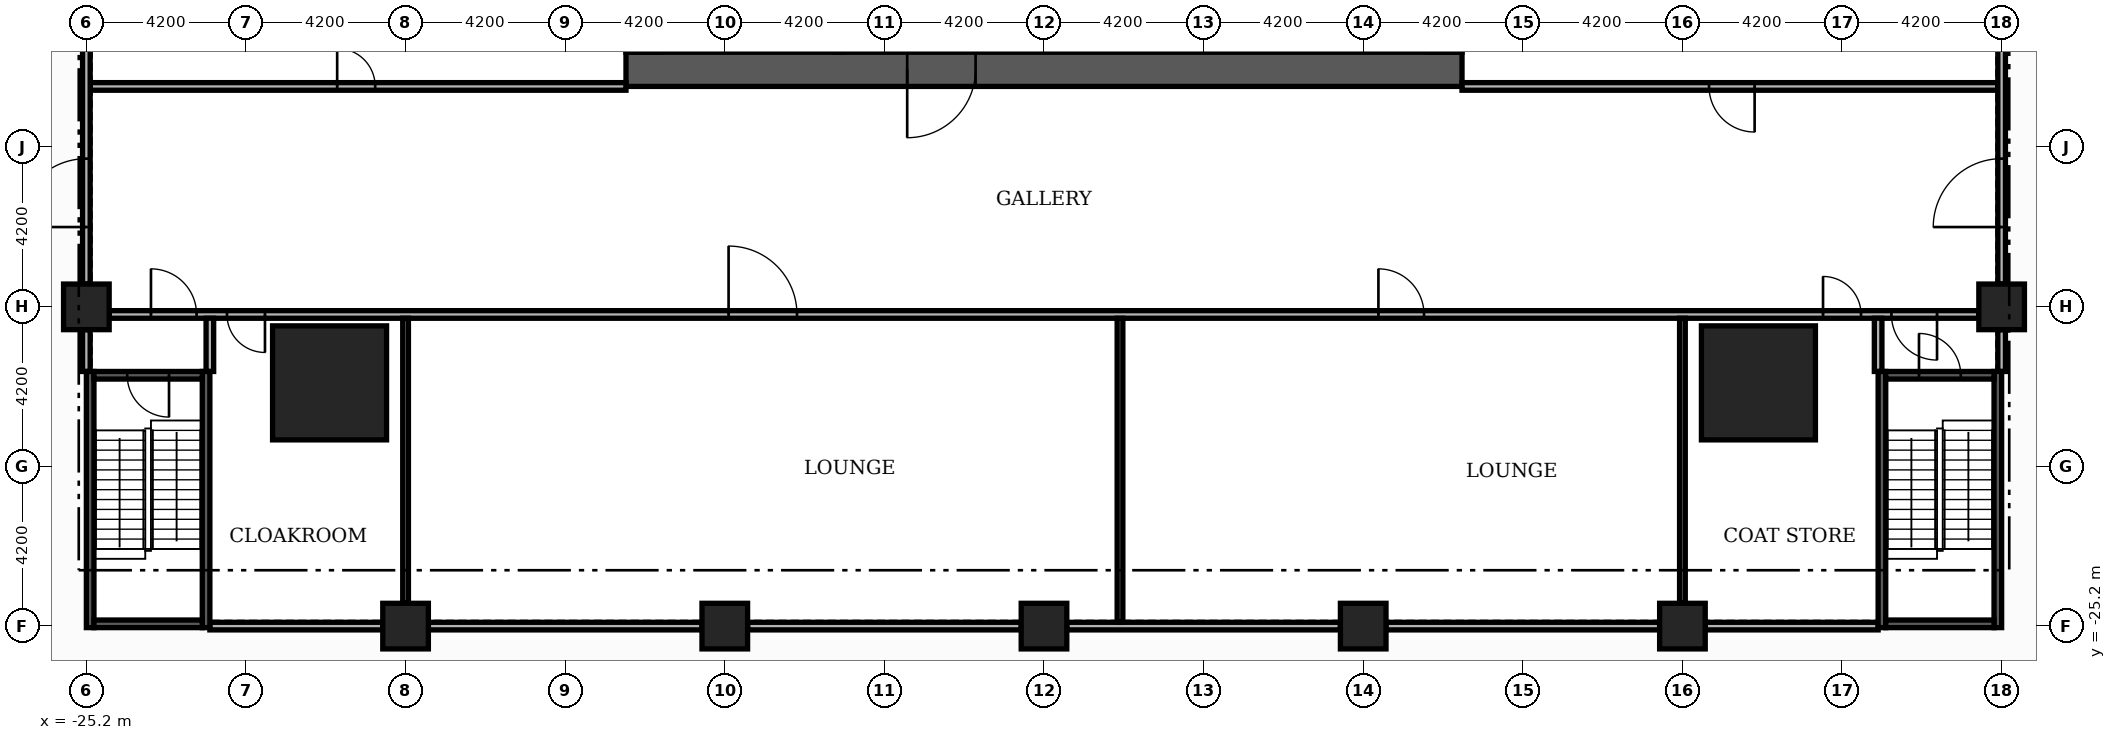
"""IFC4 building model, lengths in metres.
Left out: names, types, materials, properties, quantities, classifications, styles, units other than length and angle.
Written with IfcOpenShell. Run it as: python <this file> out.ifc"""

import sys

from ifc_helpers import new_model, si_unit, direction, frame, frame_2d, origin, origin_2d, place, context, subcontext, project, spatial, rectangle, extrude, element, fill, save


model = new_model("IFC4")
c1 = context("Model", 3, precision=1e-05, world=origin(), true_north=direction((0.0, 1.0)))
c2 = subcontext(c1, "Body", "Model", "MODEL_VIEW")
j1 = project(units=[si_unit("LENGTHUNIT", "METRE"), si_unit("PLANEANGLEUNIT", "RADIAN")], contexts=[c1])
p1 = place(None, origin())
s1 = spatial("IfcSite", under=j1, at=p1, CompositionType="ELEMENT")
p2 = place(p1, origin())
s2 = spatial("IfcBuilding", under=s1, at=p2, CompositionType="ELEMENT")
p3 = place(p2, frame((0.0, 0.0, 7.2)))
s3 = spatial("IfcBuildingStorey", under=s2, at=p3, CompositionType="ELEMENT", Elevation=7.2)
p4 = place(p3, frame((-11.0, -10.55, 0.0), z_axis=(0.0, 0.0, 1.0), x_axis=(1.0, 0.0, 0.0)))
e1 = element("IfcWall", 1, at=p4, inside=s3, PredefinedType="SHEAR", context=c2, shape_type="SweptSolid", body=[
    extrude(rectangle(XDim=22.0, YDim=0.9, at=frame_2d((11.0, 0.0))), origin(), (0.0, 0.0, 1.0), 4.38),
])
p5 = place(p4, frame((7.4, 0.0, 0.0)))
e2 = element("IfcOpeningElement", 2, at=p5, cuts=e1, PredefinedType="OPENING", context=c2, shape_type="SweptSolid", body=[
    extrude(rectangle(XDim=1.8, YDim=2.2, at=frame_2d((0.9, 1.1))), frame((0.0, 0.46, 0.0), z_axis=(0.0, -1.0, 0.0), x_axis=(1.0, 0.0, 0.0)), (0.0, 0.0, 1.0), 0.92),
])
for number, where, z_axis, x_axis in (
    (3, (18.8, -18.8, 0.0), (0.0, 0.0, 1.0), (1.0, 0.0, 0.0)),
    (4, (-18.8, -18.8, 0.0), (0.0, 0.0, 1.0), (1.0, 0.0, 0.0)),
):
    element("IfcColumn", number, at=place(p3, frame(where, z_axis=z_axis, x_axis=x_axis)), inside=s3, PredefinedType="COLUMN", context=c2, shape_type="SweptSolid", body=[
        extrude(rectangle(XDim=3.0, YDim=3.0, at=origin_2d()), origin(), (0.0, 0.0, 1.0), 4.8),
    ])
for number, where, z_axis, x_axis in (
    (5, (25.2, -16.8, 0.0), (0.0, 0.0, 1.0), (1.0, 0.0, 0.0)),
    (6, (0.0, -25.2, 0.0), (0.0, 0.0, 1.0), (1.0, 0.0, 0.0)),
    (7, (8.4, -25.2, 0.0), (0.0, 0.0, 1.0), (1.0, 0.0, 0.0)),
    (8, (16.8, -25.2, 0.0), (0.0, 0.0, 1.0), (1.0, 0.0, 0.0)),
    (9, (-8.4, -25.2, 0.0), (0.0, 0.0, 1.0), (1.0, 0.0, 0.0)),
    (10, (-16.8, -25.2, 0.0), (0.0, 0.0, 1.0), (1.0, 0.0, 0.0)),
    (11, (-25.2, -16.8, 0.0), (0.0, 0.0, 1.0), (1.0, 0.0, 0.0)),
):
    element("IfcColumn", number, at=place(p3, frame(where, z_axis=z_axis, x_axis=x_axis)), inside=s3, PredefinedType="COLUMN", context=c2, shape_type="SweptSolid", body=[
        extrude(rectangle(XDim=1.2, YDim=1.2, at=origin_2d()), origin(), (0.0, 0.0, 1.0), 4.8),
    ])
p6 = place(p3, frame((-21.95, -25.2, 0.0), z_axis=(0.0, 0.0, 1.0), x_axis=(1.0, 0.0, 0.0)))
e12 = element("IfcWall", 12, at=p6, inside=s3, PredefinedType="PARTITIONING", context=c2, shape_type="SweptSolid", body=[
    extrude(rectangle(XDim=4.55, YDim=0.2, at=frame_2d((2.275, 0.0))), origin(), (0.0, 0.0, 1.0), 4.08),
])
for number, where, z_axis, x_axis in (
    (13, (-16.2, -25.2, 0.0), (0.0, 0.0, 1.0), (1.0, 0.0, 0.0)),
    (14, (-7.8, -25.2, 0.0), (0.0, 0.0, 1.0), (1.0, 0.0, 0.0)),
    (15, (0.6, -25.2, 0.0), (0.0, 0.0, 1.0), (1.0, 0.0, 0.0)),
    (16, (9.0, -25.2, 0.0), (0.0, 0.0, 1.0), (1.0, 0.0, 0.0)),
):
    element("IfcWall", number, at=place(p3, frame(where, z_axis=z_axis, x_axis=x_axis)), inside=s3, PredefinedType="PARTITIONING", context=c2, shape_type="SweptSolid", body=[
        extrude(rectangle(XDim=7.2, YDim=0.2, at=frame_2d((3.6, 0.0))), origin(), (0.0, 0.0, 1.0), 4.08),
    ])
p7 = place(p3, frame((17.4, -25.2, 0.0), z_axis=(0.0, 0.0, 1.0), x_axis=(1.0, 0.0, 0.0)))
e17 = element("IfcWall", 17, at=p7, inside=s3, PredefinedType="PARTITIONING", context=c2, shape_type="SweptSolid", body=[
    extrude(rectangle(XDim=4.55, YDim=0.2, at=frame_2d((2.275, 0.0))), origin(), (0.0, 0.0, 1.0), 4.08),
])
p8 = place(p3, frame((-24.6, -17.0, 0.0), z_axis=(0.0, 0.0, 1.0), x_axis=(1.0, 0.0, 0.0)))
e18 = element("IfcWall", 18, at=p8, inside=s3, PredefinedType="PARTITIONING", context=c2, shape_type="SweptSolid", body=[
    extrude(rectangle(XDim=49.2, YDim=0.2, at=frame_2d((24.6, 0.0))), origin(), (0.0, 0.0, 1.0), 4.38),
])
p9 = place(p8, frame((1.1, 0.0, 0.0)))
e19 = element("IfcOpeningElement", 19, at=p9, cuts=e18, PredefinedType="OPENING", context=c2, shape_type="SweptSolid", body=[
    extrude(rectangle(XDim=1.2, YDim=2.2, at=frame_2d((0.6, 1.1))), frame((0.0, 0.11, 0.0), z_axis=(0.0, -1.0, 0.0), x_axis=(1.0, 0.0, 0.0)), (0.0, 0.0, 1.0), 0.22),
])
p10 = place(p8, frame((3.1, 0.0, 0.0)))
e20 = element("IfcOpeningElement", 20, at=p10, cuts=e18, PredefinedType="OPENING", context=c2, shape_type="SweptSolid", body=[
    extrude(rectangle(XDim=1.0, YDim=2.1, at=frame_2d((0.5, 1.05))), frame((0.0, 0.11, 0.0), z_axis=(0.0, -1.0, 0.0), x_axis=(1.0, 0.0, 0.0)), (0.0, 0.0, 1.0), 0.22),
])
p11 = place(p8, frame((16.3, 0.0, 0.0)))
e21 = element("IfcOpeningElement", 21, at=p11, cuts=e18, PredefinedType="OPENING", context=c2, shape_type="SweptSolid", body=[
    extrude(rectangle(XDim=1.8, YDim=2.2, at=frame_2d((0.9, 1.1))), frame((0.0, 0.11, 0.0), z_axis=(0.0, -1.0, 0.0), x_axis=(1.0, 0.0, 0.0)), (0.0, 0.0, 1.0), 0.22),
])
p12 = place(p8, frame((33.4, 0.0, 0.0)))
e22 = element("IfcOpeningElement", 22, at=p12, cuts=e18, PredefinedType="OPENING", context=c2, shape_type="SweptSolid", body=[
    extrude(rectangle(XDim=1.2, YDim=2.2, at=frame_2d((0.6, 1.1))), frame((0.0, 0.11, 0.0), z_axis=(0.0, -1.0, 0.0), x_axis=(1.0, 0.0, 0.0)), (0.0, 0.0, 1.0), 0.22),
])
p13 = place(p8, frame((45.1, 0.0, 0.0)))
e23 = element("IfcOpeningElement", 23, at=p13, cuts=e18, PredefinedType="OPENING", context=c2, shape_type="SweptSolid", body=[
    extrude(rectangle(XDim=1.0, YDim=2.1, at=frame_2d((0.5, 1.05))), frame((0.0, 0.11, 0.0), z_axis=(0.0, -1.0, 0.0), x_axis=(1.0, 0.0, 0.0)), (0.0, 0.0, 1.0), 0.22),
])
p14 = place(p8, frame((46.9, 0.0, 0.0)))
e24 = element("IfcOpeningElement", 24, at=p14, cuts=e18, PredefinedType="OPENING", context=c2, shape_type="SweptSolid", body=[
    extrude(rectangle(XDim=1.2, YDim=2.2, at=frame_2d((0.6, 1.1))), frame((0.0, 0.11, 0.0), z_axis=(0.0, -1.0, 0.0), x_axis=(1.0, 0.0, 0.0)), (0.0, 0.0, 1.0), 0.22),
])
p15 = place(p3, frame((-25.1, -11.0, 0.0), z_axis=(0.0, 0.0, 1.0), x_axis=(1.0, 0.0, 0.0)))
e25 = element("IfcWall", 25, at=p15, inside=s3, PredefinedType="PARTITIONING", context=c2, shape_type="SweptSolid", body=[
    extrude(rectangle(XDim=14.1, YDim=0.2, at=frame_2d((7.05, 0.0))), origin(), (0.0, 0.0, 1.0), 4.38),
])
p16 = place(p15, frame((6.5, 0.0, 0.0)))
e26 = element("IfcOpeningElement", 26, at=p16, cuts=e25, PredefinedType="OPENING", context=c2, shape_type="SweptSolid", body=[
    extrude(rectangle(XDim=1.0, YDim=2.1, at=frame_2d((0.5, 1.05))), frame((0.0, 0.11, 0.0), z_axis=(0.0, -1.0, 0.0), x_axis=(1.0, 0.0, 0.0)), (0.0, 0.0, 1.0), 0.22),
])
p17 = place(p3, frame((11.0, -11.0, 0.0), z_axis=(0.0, 0.0, 1.0), x_axis=(1.0, 0.0, 0.0)))
e27 = element("IfcWall", 27, at=p17, inside=s3, PredefinedType="PARTITIONING", context=c2, shape_type="SweptSolid", body=[
    extrude(rectangle(XDim=14.1, YDim=0.2, at=frame_2d((7.05, 0.0))), origin(), (0.0, 0.0, 1.0), 4.38),
])
p18 = place(p17, frame((6.5, 0.0, 0.0)))
e28 = element("IfcOpeningElement", 28, at=p18, cuts=e27, PredefinedType="OPENING", context=c2, shape_type="SweptSolid", body=[
    extrude(rectangle(XDim=1.2, YDim=2.2, at=frame_2d((0.6, 1.1))), frame((0.0, 0.11, 0.0), z_axis=(0.0, -1.0, 0.0), x_axis=(1.0, 0.0, 0.0)), (0.0, 0.0, 1.0), 0.22),
])
p19 = place(p3, frame((-25.2, -18.5, 0.0), z_axis=(0.0, 0.0, 1.0), x_axis=(0.0, 1.0, 0.0)))
e29 = element("IfcWall", 29, at=p19, inside=s3, PredefinedType="PARTITIONING", context=c2, shape_type="SweptSolid", body=[
    extrude(rectangle(XDim=1.1, YDim=0.2, at=frame_2d((0.55, 0.0))), origin(), (0.0, 0.0, 1.0), 3.98),
])
p20 = place(p3, frame((-25.2, -16.2, 0.0), z_axis=(0.0, 0.0, 1.0), x_axis=(0.0, 1.0, 0.0)))
e30 = element("IfcWall", 30, at=p20, inside=s3, PredefinedType="PARTITIONING", context=c2, shape_type="SweptSolid", body=[
    extrude(rectangle(XDim=7.2, YDim=0.2, at=frame_2d((3.6, 0.0))), origin(), (0.0, 0.0, 1.0), 4.08),
])
p21 = place(p20, frame((1.5, 0.0, 0.0)))
e31 = element("IfcOpeningElement", 31, at=p21, cuts=e30, PredefinedType="OPENING", context=c2, shape_type="SweptSolid", body=[
    extrude(rectangle(XDim=1.8, YDim=2.2, at=frame_2d((0.9, 1.1))), frame((0.0, 0.11, 0.0), z_axis=(0.0, -1.0, 0.0), x_axis=(1.0, 0.0, 0.0)), (0.0, 0.0, 1.0), 0.22),
])
p22 = place(p3, frame((-21.95, -18.5, 0.0), z_axis=(0.0, 0.0, 1.0), x_axis=(0.0, 1.0, 0.0)))
e32 = element("IfcWall", 32, at=p22, inside=s3, PredefinedType="PARTITIONING", context=c2, shape_type="SweptSolid", body=[
    extrude(rectangle(XDim=1.4, YDim=0.2, at=frame_2d((0.7, 0.0))), origin(), (0.0, 0.0, 1.0), 4.38),
])
p23 = place(p3, frame((-16.8, -24.6, 0.0), z_axis=(0.0, 0.0, 1.0), x_axis=(0.0, 1.0, 0.0)))
e33 = element("IfcWall", 33, at=p23, inside=s3, PredefinedType="PARTITIONING", context=c2, shape_type="SweptSolid", body=[
    extrude(rectangle(XDim=7.5, YDim=0.15, at=frame_2d((3.75, 0.0))), origin(), (0.0, 0.0, 1.0), 4.38),
])
p24 = place(p3, frame((2.0, -25.1, 0.0), z_axis=(0.0, 0.0, 1.0), x_axis=(0.0, 1.0, 0.0)))
e34 = element("IfcWall", 34, at=p24, inside=s3, PredefinedType="PARTITIONING", context=c2, shape_type="SweptSolid", body=[
    extrude(rectangle(XDim=8.0, YDim=0.15, at=frame_2d((4.0, 0.0))), origin(), (0.0, 0.0, 1.0), 4.38),
])
p25 = place(p3, frame((16.8, -24.6, 0.0), z_axis=(0.0, 0.0, 1.0), x_axis=(0.0, 1.0, 0.0)))
e35 = element("IfcWall", 35, at=p25, inside=s3, PredefinedType="PARTITIONING", context=c2, shape_type="SweptSolid", body=[
    extrude(rectangle(XDim=7.5, YDim=0.15, at=frame_2d((3.75, 0.0))), origin(), (0.0, 0.0, 1.0), 4.38),
])
p26 = place(p3, frame((21.95, -18.5, 0.0), z_axis=(0.0, 0.0, 1.0), x_axis=(0.0, 1.0, 0.0)))
e36 = element("IfcWall", 36, at=p26, inside=s3, PredefinedType="PARTITIONING", context=c2, shape_type="SweptSolid", body=[
    extrude(rectangle(XDim=1.4, YDim=0.2, at=frame_2d((0.7, 0.0))), origin(), (0.0, 0.0, 1.0), 4.38),
])
p27 = place(p3, frame((25.2, -18.5, 0.0), z_axis=(0.0, 0.0, 1.0), x_axis=(0.0, 1.0, 0.0)))
e37 = element("IfcWall", 37, at=p27, inside=s3, PredefinedType="PARTITIONING", context=c2, shape_type="SweptSolid", body=[
    extrude(rectangle(XDim=1.1, YDim=0.2, at=frame_2d((0.55, 0.0))), origin(), (0.0, 0.0, 1.0), 3.98),
])
p28 = place(p3, frame((25.2, -16.2, 0.0), z_axis=(0.0, 0.0, 1.0), x_axis=(0.0, 1.0, 0.0)))
e38 = element("IfcWall", 38, at=p28, inside=s3, PredefinedType="PARTITIONING", context=c2, shape_type="SweptSolid", body=[
    extrude(rectangle(XDim=7.2, YDim=0.2, at=frame_2d((3.6, 0.0))), origin(), (0.0, 0.0, 1.0), 4.08),
])
p29 = place(p28, frame((1.5, 0.0, 0.0)))
e39 = element("IfcOpeningElement", 39, at=p29, cuts=e38, PredefinedType="OPENING", context=c2, shape_type="SweptSolid", body=[
    extrude(rectangle(XDim=1.8, YDim=2.2, at=frame_2d((0.9, 1.1))), frame((0.0, 0.11, 0.0), z_axis=(0.0, -1.0, 0.0), x_axis=(1.0, 0.0, 0.0)), (0.0, 0.0, 1.0), 0.22),
])
p30 = place(p3, frame((22.05, -25.24, 0.0), z_axis=(0.0, 0.0, 1.0), x_axis=(0.0, 1.0, 0.0)))
e40 = element("IfcWall", 40, at=p30, inside=s3, PredefinedType="SOLIDWALL", context=c2, shape_type="SweptSolid", body=[
    extrude(rectangle(XDim=6.74, YDim=0.2, at=frame_2d((3.37, 0.0))), origin(), (0.0, 0.0, 1.0), 4.38),
])
p31 = place(p3, frame((25.1, -25.24, 0.0), z_axis=(0.0, 0.0, 1.0), x_axis=(0.0, 1.0, 0.0)))
e41 = element("IfcWall", 41, at=p31, inside=s3, PredefinedType="SOLIDWALL", context=c2, shape_type="SweptSolid", body=[
    extrude(rectangle(XDim=6.74, YDim=0.2, at=frame_2d((3.37, 0.0))), origin(), (0.0, 0.0, 1.0), 3.98),
])
p32 = place(p3, frame((22.15, -25.14, 0.0), z_axis=(0.0, 0.0, 1.0), x_axis=(1.0, 0.0, 0.0)))
e42 = element("IfcWall", 42, at=p32, inside=s3, PredefinedType="SOLIDWALL", context=c2, shape_type="SweptSolid", body=[
    extrude(rectangle(XDim=2.85, YDim=0.2, at=frame_2d((1.425, 0.0))), origin(), (0.0, 0.0, 1.0), 4.08),
])
p33 = place(p3, frame((22.15, -18.6, 0.0), z_axis=(0.0, 0.0, 1.0), x_axis=(1.0, 0.0, 0.0)))
e43 = element("IfcWall", 43, at=p33, inside=s3, PredefinedType="SOLIDWALL", context=c2, shape_type="SweptSolid", body=[
    extrude(rectangle(XDim=2.85, YDim=0.2, at=frame_2d((1.425, 0.0))), origin(), (0.0, 0.0, 1.0), 4.38),
])
p34 = place(p33, frame((0.875, 0.0, 0.0)))
e44 = element("IfcOpeningElement", 44, at=p34, cuts=e43, PredefinedType="OPENING", context=c2, shape_type="SweptSolid", body=[
    extrude(rectangle(XDim=1.1, YDim=2.2, at=frame_2d((0.55, 1.1))), frame((0.0, 0.11, 0.0), z_axis=(0.0, -1.0, 0.0), x_axis=(1.0, 0.0, 0.0)), (0.0, 0.0, 1.0), 0.22),
])
p35 = place(p3, frame((-25.1, -25.24, 0.0), z_axis=(0.0, 0.0, 1.0), x_axis=(0.0, 1.0, 0.0)))
e45 = element("IfcWall", 45, at=p35, inside=s3, PredefinedType="SOLIDWALL", context=c2, shape_type="SweptSolid", body=[
    extrude(rectangle(XDim=6.74, YDim=0.2, at=frame_2d((3.37, 0.0))), origin(), (0.0, 0.0, 1.0), 3.98),
])
p36 = place(p3, frame((-22.05, -25.24, 0.0), z_axis=(0.0, 0.0, 1.0), x_axis=(0.0, 1.0, 0.0)))
e46 = element("IfcWall", 46, at=p36, inside=s3, PredefinedType="SOLIDWALL", context=c2, shape_type="SweptSolid", body=[
    extrude(rectangle(XDim=6.74, YDim=0.2, at=frame_2d((3.37, 0.0))), origin(), (0.0, 0.0, 1.0), 4.38),
])
p37 = place(p3, frame((-25.0, -25.14, 0.0), z_axis=(0.0, 0.0, 1.0), x_axis=(1.0, 0.0, 0.0)))
e47 = element("IfcWall", 47, at=p37, inside=s3, PredefinedType="SOLIDWALL", context=c2, shape_type="SweptSolid", body=[
    extrude(rectangle(XDim=2.85, YDim=0.2, at=frame_2d((1.425, 0.0))), origin(), (0.0, 0.0, 1.0), 4.08),
])
p38 = place(p3, frame((-25.0, -18.6, 0.0), z_axis=(0.0, 0.0, 1.0), x_axis=(1.0, 0.0, 0.0)))
e48 = element("IfcWall", 48, at=p38, inside=s3, PredefinedType="SOLIDWALL", context=c2, shape_type="SweptSolid", body=[
    extrude(rectangle(XDim=2.85, YDim=0.2, at=frame_2d((1.425, 0.0))), origin(), (0.0, 0.0, 1.0), 4.38),
])
p39 = place(p38, frame((0.875, 0.0, 0.0)))
e49 = element("IfcOpeningElement", 49, at=p39, cuts=e48, PredefinedType="OPENING", context=c2, shape_type="SweptSolid", body=[
    extrude(rectangle(XDim=1.1, YDim=2.2, at=frame_2d((0.55, 1.1))), frame((0.0, 0.11, 0.0), z_axis=(0.0, -1.0, 0.0), x_axis=(1.0, 0.0, 0.0)), (0.0, 0.0, 1.0), 0.22),
])
p40 = place(p5, frame((1.8, 0.0, 0.0), z_axis=(0.0, 0.0, 1.0), x_axis=(-1.0, 0.0, 0.0)))
e50 = element("IfcDoor", 50, at=p40, inside=s3, OperationType="DOUBLE_DOOR_SINGLE_SWING", PredefinedType="DOOR", context=c2, shape_type="SweptSolid", body=[
    extrude(rectangle(XDim=1.8, YDim=2.2, at=frame_2d((0.9, 1.1))), frame((0.0, 0.025, 0.0), z_axis=(0.0, -1.0, 0.0), x_axis=(1.0, 0.0, 0.0)), (0.0, 0.0, 1.0), 0.05),
])
fill(e2, e50)
p41 = place(p9, origin())
e51 = element("IfcDoor", 51, at=p41, inside=s3, OperationType="SINGLE_SWING_LEFT", PredefinedType="DOOR", context=c2, shape_type="SweptSolid", body=[
    extrude(rectangle(XDim=1.2, YDim=2.2, at=frame_2d((0.6, 1.1))), frame((0.0, 0.025, 0.0), z_axis=(0.0, -1.0, 0.0), x_axis=(1.0, 0.0, 0.0)), (0.0, 0.0, 1.0), 0.05),
])
fill(e19, e51)
p42 = place(p10, origin())
e52 = element("IfcDoor", 52, at=p42, inside=s3, OperationType="SINGLE_SWING_RIGHT", PredefinedType="DOOR", context=c2, shape_type="SweptSolid", body=[
    extrude(rectangle(XDim=1.0, YDim=2.1, at=frame_2d((0.5, 1.05))), frame((0.0, 0.025, 0.0), z_axis=(0.0, -1.0, 0.0), x_axis=(1.0, 0.0, 0.0)), (0.0, 0.0, 1.0), 0.05),
])
fill(e20, e52)
p43 = place(p11, origin())
e53 = element("IfcDoor", 53, at=p43, inside=s3, OperationType="DOUBLE_DOOR_SINGLE_SWING", PredefinedType="DOOR", context=c2, shape_type="SweptSolid", body=[
    extrude(rectangle(XDim=1.8, YDim=2.2, at=frame_2d((0.9, 1.1))), frame((0.0, 0.025, 0.0), z_axis=(0.0, -1.0, 0.0), x_axis=(1.0, 0.0, 0.0)), (0.0, 0.0, 1.0), 0.05),
])
fill(e21, e53)
p44 = place(p12, origin())
e54 = element("IfcDoor", 54, at=p44, inside=s3, OperationType="SINGLE_SWING_LEFT", PredefinedType="DOOR", context=c2, shape_type="SweptSolid", body=[
    extrude(rectangle(XDim=1.2, YDim=2.2, at=frame_2d((0.6, 1.1))), frame((0.0, 0.025, 0.0), z_axis=(0.0, -1.0, 0.0), x_axis=(1.0, 0.0, 0.0)), (0.0, 0.0, 1.0), 0.05),
])
fill(e22, e54)
p45 = place(p13, origin())
e55 = element("IfcDoor", 55, at=p45, inside=s3, OperationType="SINGLE_SWING_LEFT", PredefinedType="DOOR", context=c2, shape_type="SweptSolid", body=[
    extrude(rectangle(XDim=1.0, YDim=2.1, at=frame_2d((0.5, 1.05))), frame((0.0, 0.025, 0.0), z_axis=(0.0, -1.0, 0.0), x_axis=(1.0, 0.0, 0.0)), (0.0, 0.0, 1.0), 0.05),
])
fill(e23, e55)
p46 = place(p14, origin())
e56 = element("IfcDoor", 56, at=p46, inside=s3, OperationType="SINGLE_SWING_RIGHT", PredefinedType="DOOR", context=c2, shape_type="SweptSolid", body=[
    extrude(rectangle(XDim=1.2, YDim=2.2, at=frame_2d((0.6, 1.1))), frame((0.0, 0.025, 0.0), z_axis=(0.0, -1.0, 0.0), x_axis=(1.0, 0.0, 0.0)), (0.0, 0.0, 1.0), 0.05),
])
fill(e24, e56)
p47 = place(p21, origin())
e57 = element("IfcDoor", 57, at=p47, inside=s3, OperationType="DOUBLE_DOOR_SINGLE_SWING", PredefinedType="DOOR", context=c2, shape_type="SweptSolid", body=[
    extrude(rectangle(XDim=1.8, YDim=2.2, at=frame_2d((0.9, 1.1))), frame((0.0, 0.025, 0.0), z_axis=(0.0, -1.0, 0.0), x_axis=(1.0, 0.0, 0.0)), (0.0, 0.0, 1.0), 0.05),
])
fill(e31, e57)
p48 = place(p29, origin())
e58 = element("IfcDoor", 58, at=p48, inside=s3, OperationType="DOUBLE_DOOR_SINGLE_SWING", PredefinedType="DOOR", context=c2, shape_type="SweptSolid", body=[
    extrude(rectangle(XDim=1.8, YDim=2.2, at=frame_2d((0.9, 1.1))), frame((0.0, 0.025, 0.0), z_axis=(0.0, -1.0, 0.0), x_axis=(1.0, 0.0, 0.0)), (0.0, 0.0, 1.0), 0.05),
])
fill(e39, e58)
p49 = place(p16, origin())
e59 = element("IfcDoor", 59, at=p49, inside=s3, OperationType="SINGLE_SWING_LEFT", PredefinedType="DOOR", context=c2, shape_type="SweptSolid", body=[
    extrude(rectangle(XDim=1.0, YDim=2.1, at=frame_2d((0.5, 1.05))), frame((0.0, 0.025, 0.0), z_axis=(0.0, -1.0, 0.0), x_axis=(1.0, 0.0, 0.0)), (0.0, 0.0, 1.0), 0.05),
])
fill(e26, e59)
p50 = place(p18, origin())
e60 = element("IfcDoor", 60, at=p50, inside=s3, OperationType="SINGLE_SWING_RIGHT", PredefinedType="DOOR", context=c2, shape_type="SweptSolid", body=[
    extrude(rectangle(XDim=1.2, YDim=2.2, at=frame_2d((0.6, 1.1))), frame((0.0, 0.025, 0.0), z_axis=(0.0, -1.0, 0.0), x_axis=(1.0, 0.0, 0.0)), (0.0, 0.0, 1.0), 0.05),
])
fill(e28, e60)
p51 = place(p34, origin())
e61 = element("IfcDoor", 61, at=p51, inside=s3, OperationType="SINGLE_SWING_LEFT", PredefinedType="DOOR", context=c2, shape_type="SweptSolid", body=[
    extrude(rectangle(XDim=1.1, YDim=2.2, at=frame_2d((0.55, 1.1))), frame((0.0, 0.025, 0.0), z_axis=(0.0, -1.0, 0.0), x_axis=(1.0, 0.0, 0.0)), (0.0, 0.0, 1.0), 0.05),
])
fill(e44, e61)
p52 = place(p39, origin())
e62 = element("IfcDoor", 62, at=p52, inside=s3, OperationType="SINGLE_SWING_RIGHT", PredefinedType="DOOR", context=c2, shape_type="SweptSolid", body=[
    extrude(rectangle(XDim=1.1, YDim=2.2, at=frame_2d((0.55, 1.1))), frame((0.0, 0.025, 0.0), z_axis=(0.0, -1.0, 0.0), x_axis=(1.0, 0.0, 0.0)), (0.0, 0.0, 1.0), 0.05),
])
fill(e49, e62)
save(model, sys.argv[1])
